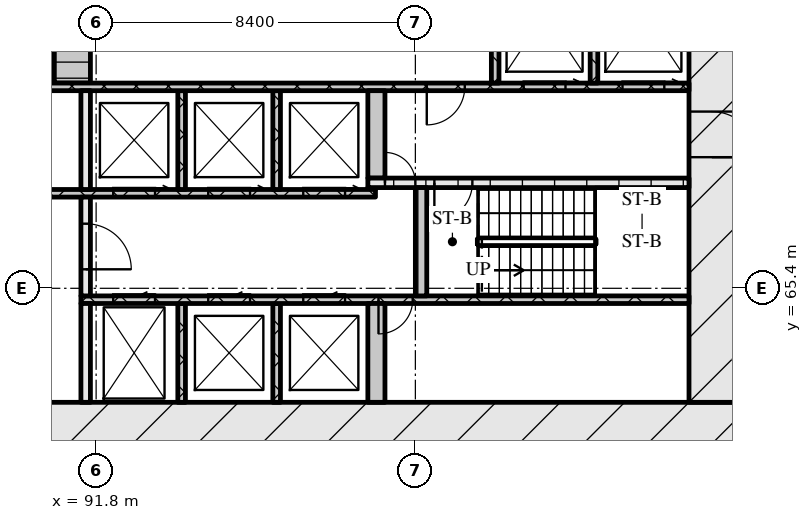
"""IFC4 building model, lengths in metres.
Left out: names, types, materials, properties, quantities, classifications, styles, units other than length and angle.
Written with IfcOpenShell. Run it as: python <this file> out.ifc"""

import sys

from ifc_helpers import new_model, si_unit, direction, frame, frame_2d, origin, place, context, subcontext, project, spatial, rectangle, extrude, element, fill, save


model = new_model("IFC4")
c1 = context("Model", 3, precision=1e-05, world=origin(), true_north=direction((0.0, 1.0)))
c2 = subcontext(c1, "Body", "Model", "MODEL_VIEW")
j1 = project(units=[si_unit("LENGTHUNIT", "METRE"), si_unit("PLANEANGLEUNIT", "RADIAN")], contexts=[c1])
p1 = place(None, origin())
s1 = spatial("IfcSite", under=j1, at=p1, CompositionType="ELEMENT")
p2 = place(p1, origin())
s2 = spatial("IfcBuilding", under=s1, at=p2, CompositionType="ELEMENT")
p3 = place(p2, origin())
s3 = spatial("IfcBuildingStorey", under=s2, at=p3, CompositionType="ELEMENT", Elevation=0.0)
p4 = place(p3, frame((66.6, 61.8, 0.0), z_axis=(0.0, 0.0, 1.0), x_axis=(1.0, 0.0, 0.0)))
e1 = element("IfcWall", 1, at=p4, inside=s3, PredefinedType="SOLIDWALL", context=c2, shape_type="SweptSolid", body=[
    extrude(rectangle(XDim=42.0, YDim=1.2, at=frame_2d((21.0, 0.0))), origin(), (0.0, 0.0, 1.0), 8.7),
])
p5 = place(p4, frame((21.35, 0.0, 0.0)))
e2 = element("IfcOpeningElement", 2, at=p5, cuts=e1, PredefinedType="OPENING", context=c2, shape_type="SweptSolid", body=[
    extrude(rectangle(XDim=1.8, YDim=2.1, at=frame_2d((0.9, 1.05))), frame((0.0, 0.61, 0.0), z_axis=(0.0, -1.0, 0.0), x_axis=(1.0, 0.0, 0.0)), (0.0, 0.0, 1.0), 1.22),
])
p6 = place(p3, frame((108.0, 62.4, 0.0), z_axis=(0.0, 0.0, 1.0), x_axis=(0.0, 1.0, 0.0)))
e3 = element("IfcWall", 3, at=p6, inside=s3, PredefinedType="SOLIDWALL", context=c2, shape_type="SweptSolid", body=[
    extrude(rectangle(XDim=12.0, YDim=1.2, at=frame_2d((6.0, 0.0))), origin(), (0.0, 0.0, 1.0), 8.7),
])
p7 = place(p6, frame((6.45, 0.0, 0.0)))
e4 = element("IfcOpeningElement", 4, at=p7, cuts=e3, PredefinedType="OPENING", context=c2, shape_type="SweptSolid", body=[
    extrude(rectangle(XDim=1.2, YDim=2.1, at=frame_2d((0.6, 1.05))), frame((0.0, 0.61, 0.0), z_axis=(0.0, -1.0, 0.0), x_axis=(1.0, 0.0, 0.0)), (0.0, 0.0, 1.0), 1.22),
])
p8 = place(p3, frame((91.525, 62.4, 0.0), z_axis=(0.0, 0.0, 1.0), x_axis=(0.0, 1.0, 0.0)))
e5 = element("IfcWall", 5, at=p8, inside=s3, PredefinedType="SOLIDWALL", context=c2, shape_type="SweptSolid", body=[
    extrude(rectangle(XDim=2.6, YDim=0.25, at=frame_2d((1.3, 0.0))), origin(), (0.0, 0.0, 1.0), 8.7),
])
for number, where, z_axis, x_axis in (
    (6, (94.05, 62.4, 0.0), (0.0, 0.0, 1.0), (0.0, 1.0, 0.0)),
    (7, (96.55, 62.4, 0.0), (0.0, 0.0, 1.0), (0.0, 1.0, 0.0)),
):
    element("IfcWall", number, at=place(p3, frame(where, z_axis=z_axis, x_axis=x_axis)), inside=s3, PredefinedType="SOLIDWALL", context=c2, shape_type="SweptSolid", body=[
        extrude(rectangle(XDim=2.6, YDim=0.2, at=frame_2d((1.3, 0.0))), origin(), (0.0, 0.0, 1.0), 8.7),
    ])
p9 = place(p3, frame((99.175, 62.4, 0.0), z_axis=(0.0, 0.0, 1.0), x_axis=(0.0, 1.0, 0.0)))
e8 = element("IfcWall", 8, at=p9, inside=s3, PredefinedType="SOLIDWALL", context=c2, shape_type="SweptSolid", body=[
    extrude(rectangle(XDim=2.6, YDim=0.45, at=frame_2d((1.3, 0.0))), origin(), (0.0, 0.0, 1.0), 8.7),
])
p10 = place(p3, frame((91.4, 65.1, 0.0), z_axis=(0.0, 0.0, 1.0), x_axis=(1.0, 0.0, 0.0)))
e9 = element("IfcWall", 9, at=p10, inside=s3, PredefinedType="SOLIDWALL", context=c2, shape_type="SweptSolid", body=[
    extrude(rectangle(XDim=16.0, YDim=0.2, at=frame_2d((8.0, 0.0))), origin(), (0.0, 0.0, 1.0), 8.7),
])
p11 = place(p10, frame((0.85, 0.0, 0.0)))
e10 = element("IfcOpeningElement", 10, at=p11, cuts=e9, PredefinedType="OPENING", context=c2, shape_type="SweptSolid", body=[
    extrude(rectangle(XDim=1.1, YDim=2.1, at=frame_2d((0.55, 1.05))), frame((0.0, 0.11, 0.0), z_axis=(0.0, -1.0, 0.0), x_axis=(1.0, 0.0, 0.0)), (0.0, 0.0, 1.0), 0.22),
])
p12 = place(p10, frame((3.35, 0.0, 0.0)))
e11 = element("IfcOpeningElement", 11, at=p12, cuts=e9, PredefinedType="OPENING", context=c2, shape_type="SweptSolid", body=[
    extrude(rectangle(XDim=1.1, YDim=2.1, at=frame_2d((0.55, 1.05))), frame((0.0, 0.11, 0.0), z_axis=(0.0, -1.0, 0.0), x_axis=(1.0, 0.0, 0.0)), (0.0, 0.0, 1.0), 0.22),
])
p13 = place(p10, frame((5.85, 0.0, 0.0)))
e12 = element("IfcOpeningElement", 12, at=p13, cuts=e9, PredefinedType="OPENING", context=c2, shape_type="SweptSolid", body=[
    extrude(rectangle(XDim=1.1, YDim=2.1, at=frame_2d((0.55, 1.05))), frame((0.0, 0.11, 0.0), z_axis=(0.0, -1.0, 0.0), x_axis=(1.0, 0.0, 0.0)), (0.0, 0.0, 1.0), 0.22),
])
p14 = place(p10, frame((7.83, 0.0, 0.0)))
e13 = element("IfcOpeningElement", 13, at=p14, cuts=e9, PredefinedType="OPENING", context=c2, shape_type="SweptSolid", body=[
    extrude(rectangle(XDim=0.9, YDim=2.1, at=frame_2d((0.45, 1.05))), frame((0.0, 0.11, 0.0), z_axis=(0.0, -1.0, 0.0), x_axis=(1.0, 0.0, 0.0)), (0.0, 0.0, 1.0), 0.22),
])
p15 = place(p3, frame((91.525, 65.2, 0.0), z_axis=(0.0, 0.0, 1.0), x_axis=(0.0, 1.0, 0.0)))
e14 = element("IfcWall", 14, at=p15, inside=s3, PredefinedType="SOLIDWALL", context=c2, shape_type="SweptSolid", body=[
    extrude(rectangle(XDim=2.6, YDim=0.25, at=frame_2d((1.3, 0.0))), origin(), (0.0, 0.0, 1.0), 8.7),
])
p16 = place(p15, frame((0.7, 0.0, 0.0)))
e15 = element("IfcOpeningElement", 15, at=p16, cuts=e14, PredefinedType="OPENING", context=c2, shape_type="SweptSolid", body=[
    extrude(rectangle(XDim=1.2, YDim=2.1, at=frame_2d((0.6, 1.05))), frame((0.0, 0.135, 0.0), z_axis=(0.0, -1.0, 0.0), x_axis=(1.0, 0.0, 0.0)), (0.0, 0.0, 1.0), 0.27),
])
p17 = place(p3, frame((100.35, 65.2, 0.0), z_axis=(0.0, 0.0, 1.0), x_axis=(0.0, 1.0, 0.0)))
e16 = element("IfcWall", 16, at=p17, inside=s3, PredefinedType="SOLIDWALL", context=c2, shape_type="SweptSolid", body=[
    extrude(rectangle(XDim=2.85, YDim=0.3, at=frame_2d((1.425, 0.0))), origin(), (0.0, 0.0, 1.0), 8.7),
])
p18 = place(p3, frame((76.05, 67.9, 0.0), z_axis=(0.0, 0.0, 1.0), x_axis=(1.0, 0.0, 0.0)))
e17 = element("IfcWall", 17, at=p18, inside=s3, PredefinedType="SOLIDWALL", context=c2, shape_type="SweptSolid", body=[
    extrude(rectangle(XDim=23.1, YDim=0.2, at=frame_2d((11.55, 0.0))), origin(), (0.0, 0.0, 1.0), 8.7),
])
p19 = place(p18, frame((0.6, 0.0, 0.0)))
e18 = element("IfcOpeningElement", 18, at=p19, cuts=e17, PredefinedType="OPENING", context=c2, shape_type="SweptSolid", body=[
    extrude(rectangle(XDim=1.1, YDim=2.1, at=frame_2d((0.55, 1.05))), frame((0.0, 0.11, 0.0), z_axis=(0.0, -1.0, 0.0), x_axis=(1.0, 0.0, 0.0)), (0.0, 0.0, 1.0), 0.22),
])
p20 = place(p18, frame((3.1, 0.0, 0.0)))
e19 = element("IfcOpeningElement", 19, at=p20, cuts=e17, PredefinedType="OPENING", context=c2, shape_type="SweptSolid", body=[
    extrude(rectangle(XDim=1.1, YDim=2.1, at=frame_2d((0.55, 1.05))), frame((0.0, 0.11, 0.0), z_axis=(0.0, -1.0, 0.0), x_axis=(1.0, 0.0, 0.0)), (0.0, 0.0, 1.0), 0.22),
])
p21 = place(p18, frame((5.6, 0.0, 0.0)))
e20 = element("IfcOpeningElement", 20, at=p21, cuts=e17, PredefinedType="OPENING", context=c2, shape_type="SweptSolid", body=[
    extrude(rectangle(XDim=1.1, YDim=2.1, at=frame_2d((0.55, 1.05))), frame((0.0, 0.11, 0.0), z_axis=(0.0, -1.0, 0.0), x_axis=(1.0, 0.0, 0.0)), (0.0, 0.0, 1.0), 0.22),
])
p22 = place(p18, frame((8.35, 0.0, 0.0)))
e21 = element("IfcOpeningElement", 21, at=p22, cuts=e17, PredefinedType="OPENING", context=c2, shape_type="SweptSolid", body=[
    extrude(rectangle(XDim=1.1, YDim=2.1, at=frame_2d((0.55, 1.05))), frame((0.0, 0.11, 0.0), z_axis=(0.0, -1.0, 0.0), x_axis=(1.0, 0.0, 0.0)), (0.0, 0.0, 1.0), 0.22),
])
p23 = place(p18, frame((10.85, 0.0, 0.0)))
e22 = element("IfcOpeningElement", 22, at=p23, cuts=e17, PredefinedType="OPENING", context=c2, shape_type="SweptSolid", body=[
    extrude(rectangle(XDim=1.1, YDim=2.1, at=frame_2d((0.55, 1.05))), frame((0.0, 0.11, 0.0), z_axis=(0.0, -1.0, 0.0), x_axis=(1.0, 0.0, 0.0)), (0.0, 0.0, 1.0), 0.22),
])
p24 = place(p18, frame((13.55, 0.0, 0.0)))
e23 = element("IfcOpeningElement", 23, at=p24, cuts=e17, PredefinedType="OPENING", context=c2, shape_type="SweptSolid", body=[
    extrude(rectangle(XDim=1.0, YDim=2.1, at=frame_2d((0.5, 1.05))), frame((0.0, 0.11, 0.0), z_axis=(0.0, -1.0, 0.0), x_axis=(1.0, 0.0, 0.0)), (0.0, 0.0, 1.0), 0.22),
])
p25 = place(p18, frame((16.2, 0.0, 0.0)))
e24 = element("IfcOpeningElement", 24, at=p25, cuts=e17, PredefinedType="OPENING", context=c2, shape_type="SweptSolid", body=[
    extrude(rectangle(XDim=1.1, YDim=2.1, at=frame_2d((0.55, 1.05))), frame((0.0, 0.11, 0.0), z_axis=(0.0, -1.0, 0.0), x_axis=(1.0, 0.0, 0.0)), (0.0, 0.0, 1.0), 0.22),
])
p26 = place(p18, frame((18.7, 0.0, 0.0)))
e25 = element("IfcOpeningElement", 25, at=p26, cuts=e17, PredefinedType="OPENING", context=c2, shape_type="SweptSolid", body=[
    extrude(rectangle(XDim=1.1, YDim=2.1, at=frame_2d((0.55, 1.05))), frame((0.0, 0.11, 0.0), z_axis=(0.0, -1.0, 0.0), x_axis=(1.0, 0.0, 0.0)), (0.0, 0.0, 1.0), 0.22),
])
p27 = place(p18, frame((21.2, 0.0, 0.0)))
e26 = element("IfcOpeningElement", 26, at=p27, cuts=e17, PredefinedType="OPENING", context=c2, shape_type="SweptSolid", body=[
    extrude(rectangle(XDim=1.1, YDim=2.1, at=frame_2d((0.55, 1.05))), frame((0.0, 0.11, 0.0), z_axis=(0.0, -1.0, 0.0), x_axis=(1.0, 0.0, 0.0)), (0.0, 0.0, 1.0), 0.22),
])
p28 = place(p3, frame((91.525, 68.0, 0.0), z_axis=(0.0, 0.0, 1.0), x_axis=(0.0, 1.0, 0.0)))
e27 = element("IfcWall", 27, at=p28, inside=s3, PredefinedType="SOLIDWALL", context=c2, shape_type="SweptSolid", body=[
    extrude(rectangle(XDim=2.6, YDim=0.25, at=frame_2d((1.3, 0.0))), origin(), (0.0, 0.0, 1.0), 8.7),
])
for number, where, z_axis, x_axis in (
    (28, (94.05, 68.0, 0.0), (0.0, 0.0, 1.0), (0.0, 1.0, 0.0)),
    (29, (96.55, 68.0, 0.0), (0.0, 0.0, 1.0), (0.0, 1.0, 0.0)),
):
    element("IfcWall", number, at=place(p3, frame(where, z_axis=z_axis, x_axis=x_axis)), inside=s3, PredefinedType="SOLIDWALL", context=c2, shape_type="SweptSolid", body=[
        extrude(rectangle(XDim=2.6, YDim=0.2, at=frame_2d((1.3, 0.0))), origin(), (0.0, 0.0, 1.0), 8.7),
    ])
p29 = place(p3, frame((98.95, 68.025, 0.0), z_axis=(0.0, 0.0, 1.0), x_axis=(1.0, 0.0, 0.0)))
e30 = element("IfcWall", 30, at=p29, inside=s3, PredefinedType="SOLIDWALL", context=c2, shape_type="SweptSolid", body=[
    extrude(rectangle(XDim=0.2, YDim=0.05, at=frame_2d((0.1, 0.0))), origin(), (0.0, 0.0, 1.0), 8.7),
])
p30 = place(p3, frame((98.95, 68.175, 0.0), z_axis=(0.0, 0.0, 1.0), x_axis=(1.0, 0.0, 0.0)))
e31 = element("IfcWall", 31, at=p30, inside=s3, PredefinedType="SOLIDWALL", context=c2, shape_type="SweptSolid", body=[
    extrude(rectangle(XDim=8.45, YDim=0.25, at=frame_2d((4.225, 0.0))), origin(), (0.0, 0.0, 1.0), 8.7),
])
p31 = place(p30, frame((0.45, 0.0, 0.0)))
e32 = element("IfcOpeningElement", 32, at=p31, cuts=e31, PredefinedType="OPENING", context=c2, shape_type="SweptSolid", body=[
    extrude(rectangle(XDim=0.8, YDim=2.1, at=frame_2d((0.4, 1.05))), frame((0.0, 0.135, 0.0), z_axis=(0.0, -1.0, 0.0), x_axis=(1.0, 0.0, 0.0)), (0.0, 0.0, 1.0), 0.27),
])
p32 = place(p30, frame((1.75, 0.0, 0.0)))
e33 = element("IfcOpeningElement", 33, at=p32, cuts=e31, PredefinedType="OPENING", context=c2, shape_type="SweptSolid", body=[
    extrude(rectangle(XDim=1.0, YDim=2.1, at=frame_2d((0.5, 1.05))), frame((0.0, 0.135, 0.0), z_axis=(0.0, -1.0, 0.0), x_axis=(1.0, 0.0, 0.0)), (0.0, 0.0, 1.0), 0.27),
])
p33 = place(p3, frame((99.175, 68.3, 0.0), z_axis=(0.0, 0.0, 1.0), x_axis=(0.0, 1.0, 0.0)))
e34 = element("IfcWall", 34, at=p33, inside=s3, PredefinedType="SOLIDWALL", context=c2, shape_type="SweptSolid", body=[
    extrude(rectangle(XDim=2.3, YDim=0.45, at=frame_2d((1.15, 0.0))), origin(), (0.0, 0.0, 1.0), 8.7),
])
p34 = place(p3, frame((67.8, 70.7, 0.0), z_axis=(0.0, 0.0, 1.0), x_axis=(1.0, 0.0, 0.0)))
e35 = element("IfcWall", 35, at=p34, inside=s3, PredefinedType="SOLIDWALL", context=c2, shape_type="SweptSolid", body=[
    extrude(rectangle(XDim=39.6, YDim=0.2, at=frame_2d((19.8, 0.0))), origin(), (0.0, 0.0, 1.0), 8.7),
])
p35 = place(p34, frame((0.65, 0.0, 0.0)))
e36 = element("IfcOpeningElement", 36, at=p35, cuts=e35, PredefinedType="OPENING", context=c2, shape_type="SweptSolid", body=[
    extrude(rectangle(XDim=1.1, YDim=2.1, at=frame_2d((0.55, 1.05))), frame((0.0, 0.11, 0.0), z_axis=(0.0, -1.0, 0.0), x_axis=(1.0, 0.0, 0.0)), (0.0, 0.0, 1.0), 0.22),
])
p36 = place(p34, frame((3.25, 0.0, 0.0)))
e37 = element("IfcOpeningElement", 37, at=p36, cuts=e35, PredefinedType="OPENING", context=c2, shape_type="SweptSolid", body=[
    extrude(rectangle(XDim=1.1, YDim=2.1, at=frame_2d((0.55, 1.05))), frame((0.0, 0.11, 0.0), z_axis=(0.0, -1.0, 0.0), x_axis=(1.0, 0.0, 0.0)), (0.0, 0.0, 1.0), 0.22),
])
p37 = place(p34, frame((5.9, 0.0, 0.0)))
e38 = element("IfcOpeningElement", 38, at=p37, cuts=e35, PredefinedType="OPENING", context=c2, shape_type="SweptSolid", body=[
    extrude(rectangle(XDim=1.0, YDim=2.1, at=frame_2d((0.5, 1.05))), frame((0.0, 0.11, 0.0), z_axis=(0.0, -1.0, 0.0), x_axis=(1.0, 0.0, 0.0)), (0.0, 0.0, 1.0), 0.22),
])
p38 = place(p34, frame((21.7, 0.0, 0.0)))
e39 = element("IfcOpeningElement", 39, at=p38, cuts=e35, PredefinedType="OPENING", context=c2, shape_type="SweptSolid", body=[
    extrude(rectangle(XDim=1.0, YDim=2.1, at=frame_2d((0.5, 1.05))), frame((0.0, 0.11, 0.0), z_axis=(0.0, -1.0, 0.0), x_axis=(1.0, 0.0, 0.0)), (0.0, 0.0, 1.0), 0.22),
])
p39 = place(p34, frame((32.7, 0.0, 0.0)))
e40 = element("IfcOpeningElement", 40, at=p39, cuts=e35, PredefinedType="OPENING", context=c2, shape_type="SweptSolid", body=[
    extrude(rectangle(XDim=1.0, YDim=2.1, at=frame_2d((0.5, 1.05))), frame((0.0, 0.11, 0.0), z_axis=(0.0, -1.0, 0.0), x_axis=(1.0, 0.0, 0.0)), (0.0, 0.0, 1.0), 0.22),
])
p40 = place(p34, frame((35.25, 0.0, 0.0)))
e41 = element("IfcOpeningElement", 41, at=p40, cuts=e35, PredefinedType="OPENING", context=c2, shape_type="SweptSolid", body=[
    extrude(rectangle(XDim=1.1, YDim=2.1, at=frame_2d((0.55, 1.05))), frame((0.0, 0.11, 0.0), z_axis=(0.0, -1.0, 0.0), x_axis=(1.0, 0.0, 0.0)), (0.0, 0.0, 1.0), 0.22),
])
p41 = place(p34, frame((37.85, 0.0, 0.0)))
e42 = element("IfcOpeningElement", 42, at=p41, cuts=e35, PredefinedType="OPENING", context=c2, shape_type="SweptSolid", body=[
    extrude(rectangle(XDim=1.1, YDim=2.1, at=frame_2d((0.55, 1.05))), frame((0.0, 0.11, 0.0), z_axis=(0.0, -1.0, 0.0), x_axis=(1.0, 0.0, 0.0)), (0.0, 0.0, 1.0), 0.22),
])
p42 = place(p3, frame((91.175, 70.8, 0.0), z_axis=(0.0, 0.0, 1.0), x_axis=(0.0, 1.0, 0.0)))
e43 = element("IfcWall", 43, at=p42, inside=s3, PredefinedType="SOLIDWALL", context=c2, shape_type="SweptSolid", body=[
    extrude(rectangle(XDim=1.2, YDim=0.95, at=frame_2d((0.6, 0.0))), origin(), (0.0, 0.0, 1.0), 8.7),
])
p43 = place(p3, frame((102.3, 70.8, 0.0), z_axis=(0.0, 0.0, 1.0), x_axis=(0.0, 1.0, 0.0)))
e44 = element("IfcWall", 44, at=p43, inside=s3, PredefinedType="SOLIDWALL", context=c2, shape_type="SweptSolid", body=[
    extrude(rectangle(XDim=1.2, YDim=0.2, at=frame_2d((0.6, 0.0))), origin(), (0.0, 0.0, 1.0), 8.7),
])
p44 = place(p3, frame((104.9, 70.8, 0.0), z_axis=(0.0, 0.0, 1.0), x_axis=(0.0, 1.0, 0.0)))
e45 = element("IfcWall", 45, at=p44, inside=s3, PredefinedType="SOLIDWALL", context=c2, shape_type="SweptSolid", body=[
    extrude(rectangle(XDim=3.6, YDim=0.2, at=frame_2d((1.8, 0.0))), origin(), (0.0, 0.0, 1.0), 8.7),
])
p45 = place(p11, origin())
e46 = element("IfcDoor", 46, at=p45, inside=s3, OperationType="SLIDING_TO_LEFT", PredefinedType="DOOR", context=c2, shape_type="SweptSolid", body=[
    extrude(rectangle(XDim=1.1, YDim=2.1, at=frame_2d((0.55, 1.05))), frame((0.0, 0.025, 0.0), z_axis=(0.0, -1.0, 0.0), x_axis=(1.0, 0.0, 0.0)), (0.0, 0.0, 1.0), 0.05),
])
fill(e10, e46)
p46 = place(p12, origin())
e47 = element("IfcDoor", 47, at=p46, inside=s3, OperationType="SLIDING_TO_LEFT", PredefinedType="DOOR", context=c2, shape_type="SweptSolid", body=[
    extrude(rectangle(XDim=1.1, YDim=2.1, at=frame_2d((0.55, 1.05))), frame((0.0, 0.025, 0.0), z_axis=(0.0, -1.0, 0.0), x_axis=(1.0, 0.0, 0.0)), (0.0, 0.0, 1.0), 0.05),
])
fill(e11, e47)
p47 = place(p13, origin())
e48 = element("IfcDoor", 48, at=p47, inside=s3, OperationType="SLIDING_TO_LEFT", PredefinedType="DOOR", context=c2, shape_type="SweptSolid", body=[
    extrude(rectangle(XDim=1.1, YDim=2.1, at=frame_2d((0.55, 1.05))), frame((0.0, 0.025, 0.0), z_axis=(0.0, -1.0, 0.0), x_axis=(1.0, 0.0, 0.0)), (0.0, 0.0, 1.0), 0.05),
])
fill(e12, e48)
p48 = place(p14, origin())
e49 = element("IfcDoor", 49, at=p48, inside=s3, OperationType="SINGLE_SWING_RIGHT", PredefinedType="DOOR", context=c2, shape_type="SweptSolid", body=[
    extrude(rectangle(XDim=0.9, YDim=2.1, at=frame_2d((0.45, 1.05))), frame((0.0, 0.025, 0.0), z_axis=(0.0, -1.0, 0.0), x_axis=(1.0, 0.0, 0.0)), (0.0, 0.0, 1.0), 0.05),
])
fill(e13, e49)
p49 = place(p16, origin())
e50 = element("IfcDoor", 50, at=p49, inside=s3, OperationType="SINGLE_SWING_RIGHT", PredefinedType="DOOR", context=c2, shape_type="SweptSolid", body=[
    extrude(rectangle(XDim=1.2, YDim=2.1, at=frame_2d((0.6, 1.05))), frame((0.0, 0.025, 0.0), z_axis=(0.0, -1.0, 0.0), x_axis=(1.0, 0.0, 0.0)), (0.0, 0.0, 1.0), 0.05),
])
fill(e15, e50)
p50 = place(p25, origin())
e51 = element("IfcDoor", 51, at=p50, inside=s3, OperationType="SLIDING_TO_RIGHT", PredefinedType="DOOR", context=c2, shape_type="SweptSolid", body=[
    extrude(rectangle(XDim=1.1, YDim=2.1, at=frame_2d((0.55, 1.05))), frame((0.0, 0.025, 0.0), z_axis=(0.0, -1.0, 0.0), x_axis=(1.0, 0.0, 0.0)), (0.0, 0.0, 1.0), 0.05),
])
fill(e24, e51)
p51 = place(p26, origin())
e52 = element("IfcDoor", 52, at=p51, inside=s3, OperationType="SLIDING_TO_RIGHT", PredefinedType="DOOR", context=c2, shape_type="SweptSolid", body=[
    extrude(rectangle(XDim=1.1, YDim=2.1, at=frame_2d((0.55, 1.05))), frame((0.0, 0.025, 0.0), z_axis=(0.0, -1.0, 0.0), x_axis=(1.0, 0.0, 0.0)), (0.0, 0.0, 1.0), 0.05),
])
fill(e25, e52)
p52 = place(p27, origin())
e53 = element("IfcDoor", 53, at=p52, inside=s3, OperationType="SLIDING_TO_RIGHT", PredefinedType="DOOR", context=c2, shape_type="SweptSolid", body=[
    extrude(rectangle(XDim=1.1, YDim=2.1, at=frame_2d((0.55, 1.05))), frame((0.0, 0.025, 0.0), z_axis=(0.0, -1.0, 0.0), x_axis=(1.0, 0.0, 0.0)), (0.0, 0.0, 1.0), 0.05),
])
fill(e26, e53)
p53 = place(p31, origin())
e54 = element("IfcDoor", 54, at=p53, inside=s3, OperationType="SINGLE_SWING_LEFT", PredefinedType="DOOR", context=c2, shape_type="SweptSolid", body=[
    extrude(rectangle(XDim=0.8, YDim=2.1, at=frame_2d((0.4, 1.05))), frame((0.0, 0.025, 0.0), z_axis=(0.0, -1.0, 0.0), x_axis=(1.0, 0.0, 0.0)), (0.0, 0.0, 1.0), 0.05),
])
fill(e32, e54)
p54 = place(p32, origin())
e55 = element("IfcDoor", 55, at=p54, inside=s3, OperationType="SINGLE_SWING_RIGHT", PredefinedType="DOOR", context=c2, shape_type="SweptSolid", body=[
    extrude(rectangle(XDim=1.0, YDim=2.1, at=frame_2d((0.5, 1.05))), frame((0.0, 0.025, 0.0), z_axis=(0.0, -1.0, 0.0), x_axis=(1.0, 0.0, 0.0)), (0.0, 0.0, 1.0), 0.05),
])
fill(e33, e55)
p55 = place(p7, origin())
e56 = element("IfcDoor", 56, at=p55, inside=s3, OperationType="SINGLE_SWING_RIGHT", PredefinedType="DOOR", context=c2, shape_type="SweptSolid", body=[
    extrude(rectangle(XDim=1.2, YDim=2.1, at=frame_2d((0.6, 1.05))), frame((0.0, 0.025, 0.0), z_axis=(0.0, -1.0, 0.0), x_axis=(1.0, 0.0, 0.0)), (0.0, 0.0, 1.0), 0.05),
])
fill(e4, e56)
p56 = place(p39, origin())
e57 = element("IfcDoor", 57, at=p56, inside=s3, OperationType="SINGLE_SWING_RIGHT", PredefinedType="DOOR", context=c2, shape_type="SweptSolid", body=[
    extrude(rectangle(XDim=1.0, YDim=2.1, at=frame_2d((0.5, 1.05))), frame((0.0, 0.025, 0.0), z_axis=(0.0, -1.0, 0.0), x_axis=(1.0, 0.0, 0.0)), (0.0, 0.0, 1.0), 0.05),
])
fill(e40, e57)
p57 = place(p40, origin())
e58 = element("IfcDoor", 58, at=p57, inside=s3, OperationType="SLIDING_TO_RIGHT", PredefinedType="DOOR", context=c2, shape_type="SweptSolid", body=[
    extrude(rectangle(XDim=1.1, YDim=2.1, at=frame_2d((0.55, 1.05))), frame((0.0, 0.025, 0.0), z_axis=(0.0, -1.0, 0.0), x_axis=(1.0, 0.0, 0.0)), (0.0, 0.0, 1.0), 0.05),
])
fill(e41, e58)
p58 = place(p41, origin())
e59 = element("IfcDoor", 59, at=p58, inside=s3, OperationType="SLIDING_TO_RIGHT", PredefinedType="DOOR", context=c2, shape_type="SweptSolid", body=[
    extrude(rectangle(XDim=1.1, YDim=2.1, at=frame_2d((0.55, 1.05))), frame((0.0, 0.025, 0.0), z_axis=(0.0, -1.0, 0.0), x_axis=(1.0, 0.0, 0.0)), (0.0, 0.0, 1.0), 0.05),
])
fill(e42, e59)
save(model, sys.argv[1])
